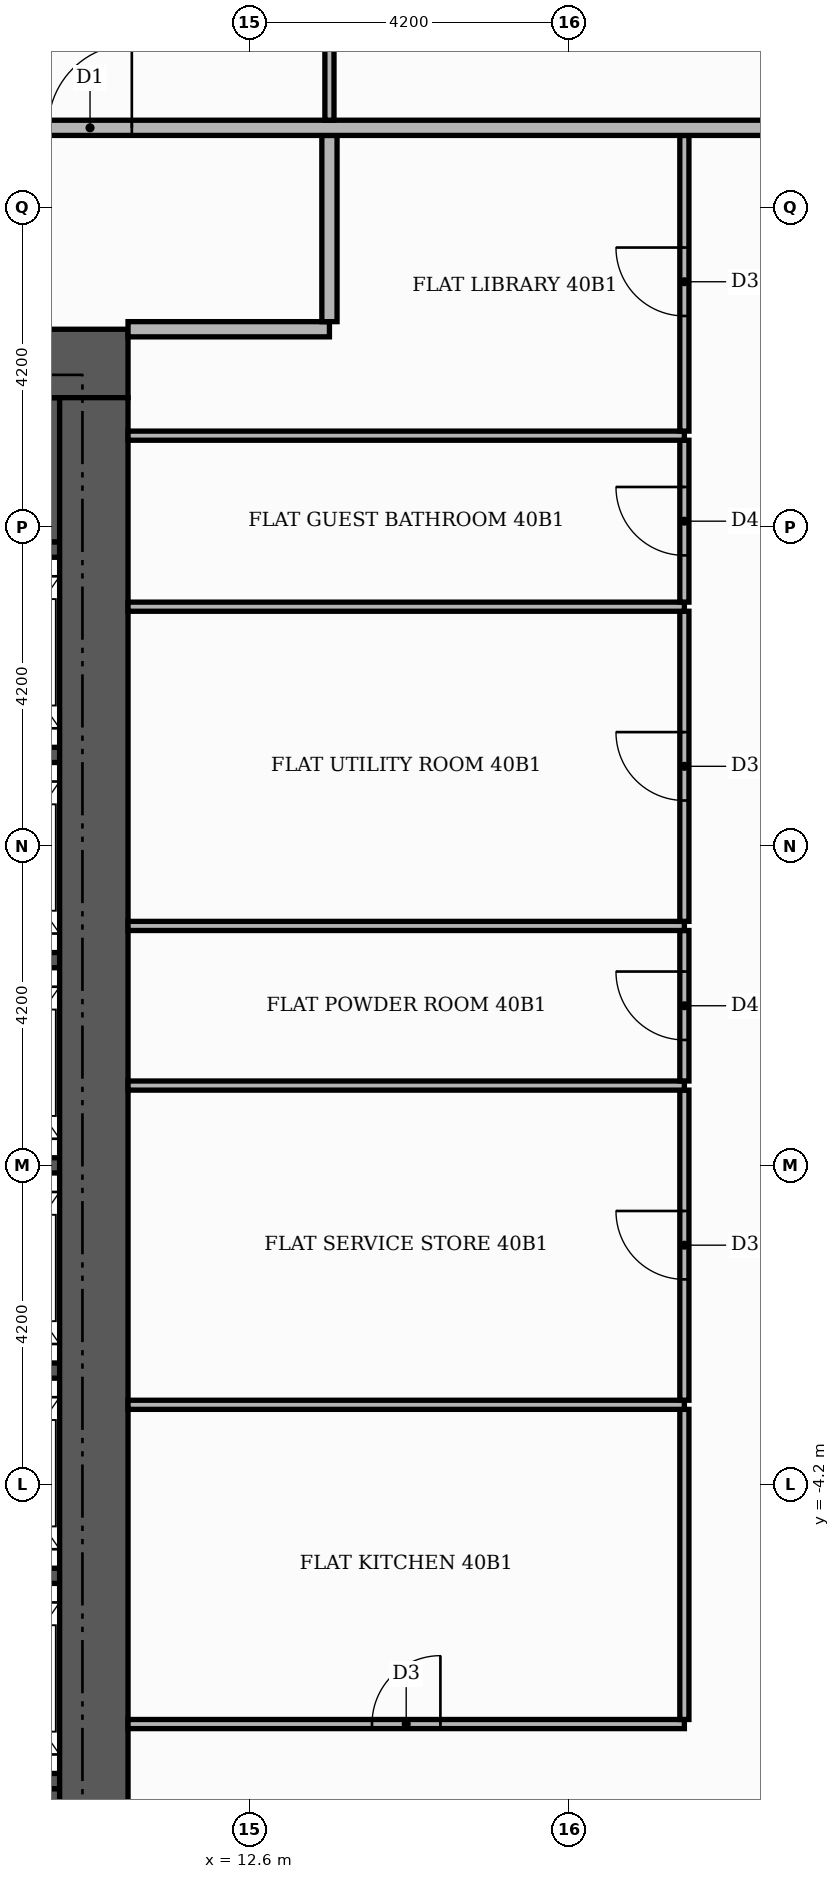
"""IFC4 building model, lengths in metres.
Left out: names, types, materials, properties, quantities, classifications, styles, units other than length and angle.
Written with IfcOpenShell. Run it as: python <this file> out.ifc"""

import sys

from ifc_helpers import new_model, si_unit, direction, frame, frame_2d, origin, place, context, subcontext, project, spatial, rectangle, extrude, element, fill, save


model = new_model("IFC4")
c1 = context("Model", 3, precision=1e-05, world=origin(), true_north=direction((0.0, 1.0)))
c2 = subcontext(c1, "Body", "Model", "MODEL_VIEW")
j1 = project(units=[si_unit("LENGTHUNIT", "METRE"), si_unit("PLANEANGLEUNIT", "RADIAN")], contexts=[c1])
p1 = place(None, origin())
s1 = spatial("IfcSite", under=j1, at=p1, CompositionType="ELEMENT")
p2 = place(p1, origin())
s2 = spatial("IfcBuilding", under=s1, at=p2, CompositionType="ELEMENT")
p3 = place(p2, frame((0.0, 0.0, 168.9)))
s3 = spatial("IfcBuildingStorey", under=s2, at=p3, CompositionType="ELEMENT", Elevation=168.9)
for number, where, z_axis, x_axis in (
    (1, (5.5, -9.15, 0.0), (0.0, 0.0, 1.0), (1.0, 0.0, 0.0)),
    (2, (5.5, 9.15, 0.0), (0.0, 0.0, 1.0), (1.0, 0.0, 0.0)),
):
    element("IfcWall", number, at=place(p3, frame(where, z_axis=z_axis, x_axis=x_axis)), inside=s3, PredefinedType="SHEAR", context=c2, shape_type="SweptSolid", body=[
        extrude(rectangle(XDim=4.6, YDim=1.9, at=frame_2d((2.3, 0.0))), origin(), (0.0, 0.0, 1.0), 3.48),
    ])
for number, where, z_axis, x_axis in (
    (3, (8.1, -8.1, 0.0), (0.0, 0.0, 1.0), (1.0, 0.0, 0.0)),
    (4, (8.1, -5.4, 0.0), (0.0, 0.0, 1.0), (1.0, 0.0, 0.0)),
    (5, (8.1, -2.7, 0.0), (0.0, 0.0, 1.0), (1.0, 0.0, 0.0)),
    (6, (8.1, 0.0, 0.0), (0.0, 0.0, 1.0), (1.0, 0.0, 0.0)),
    (7, (8.1, 2.7, 0.0), (0.0, 0.0, 1.0), (1.0, 0.0, 0.0)),
    (8, (8.1, 5.4, 0.0), (0.0, 0.0, 1.0), (1.0, 0.0, 0.0)),
    (9, (8.1, 8.1, 0.0), (0.0, 0.0, 1.0), (1.0, 0.0, 0.0)),
):
    element("IfcWall", number, at=place(p3, frame(where, z_axis=z_axis, x_axis=x_axis)), inside=s3, PredefinedType="SHEAR", context=c2, shape_type="SweptSolid", body=[
        extrude(rectangle(XDim=2.0, YDim=0.2, at=frame_2d((1.0, 0.0))), origin(), (0.0, 0.0, 1.0), 3.48),
    ])
p4 = place(p3, frame((-11.0, 10.55, 0.0), z_axis=(0.0, 0.0, 1.0), x_axis=(1.0, 0.0, 0.0)))
e10 = element("IfcWall", 10, at=p4, inside=s3, PredefinedType="SHEAR", context=c2, shape_type="SweptSolid", body=[
    extrude(rectangle(XDim=22.0, YDim=0.9, at=frame_2d((11.0, 0.0))), origin(), (0.0, 0.0, 1.0), 3.48),
])
p5 = place(p4, frame((13.3, 0.0, 0.0)))
e11 = element("IfcOpeningElement", 11, at=p5, cuts=e10, PredefinedType="OPENING", context=c2, shape_type="SweptSolid", body=[
    extrude(rectangle(XDim=1.8, YDim=2.2, at=frame_2d((0.9, 1.1))), frame((0.0, 0.46, 0.0), z_axis=(0.0, -1.0, 0.0), x_axis=(1.0, 0.0, 0.0)), (0.0, 0.0, 1.0), 0.92),
])
p6 = place(p3, frame((10.55, -10.1, 0.0), z_axis=(0.0, 0.0, 1.0), x_axis=(0.0, 1.0, 0.0)))
e12 = element("IfcWall", 12, at=p6, inside=s3, PredefinedType="SHEAR", context=c2, shape_type="SweptSolid", body=[
    extrude(rectangle(XDim=20.2, YDim=0.9, at=frame_2d((10.1, 0.0))), origin(), (0.0, 0.0, 1.0), 3.48),
])
p7 = place(p3, frame((11.0, -7.35, 0.0), z_axis=(0.0, 0.0, 1.0), x_axis=(1.0, 0.0, 0.0)))
e13 = element("IfcWall", 13, at=p7, inside=s3, PredefinedType="PARTITIONING", context=c2, shape_type="SweptSolid", body=[
    extrude(rectangle(XDim=7.32, YDim=0.12, at=frame_2d((3.66, 0.0))), origin(), (0.0, 0.0, 1.0), 3.48),
])
p8 = place(p7, frame((3.21, 0.0, 0.0)))
e14 = element("IfcOpeningElement", 14, at=p8, cuts=e13, PredefinedType="OPENING", context=c2, shape_type="SweptSolid", body=[
    extrude(rectangle(XDim=0.9, YDim=2.1, at=frame_2d((0.45, 1.05))), frame((0.0, 0.07, 0.0), z_axis=(0.0, -1.0, 0.0), x_axis=(1.0, 0.0, 0.0)), (0.0, 0.0, 1.0), 0.14),
])
p9 = place(p3, frame((18.32, -7.29, 0.0), z_axis=(0.0, 0.0, 1.0), x_axis=(0.0, 1.0, 0.0)))
e15 = element("IfcWall", 15, at=p9, inside=s3, PredefinedType="PARTITIONING", context=c2, shape_type="SweptSolid", body=[
    extrude(rectangle(XDim=4.08, YDim=0.12, at=frame_2d((2.04, 0.0))), origin(), (0.0, 0.0, 1.0), 3.48),
])
p10 = place(p3, frame((11.0, -3.15, 0.0), z_axis=(0.0, 0.0, 1.0), x_axis=(1.0, 0.0, 0.0)))
e16 = element("IfcWall", 16, at=p10, inside=s3, PredefinedType="PARTITIONING", context=c2, shape_type="SweptSolid", body=[
    extrude(rectangle(XDim=7.32, YDim=0.12, at=frame_2d((3.66, 0.0))), origin(), (0.0, 0.0, 1.0), 3.48),
])
p11 = place(p3, frame((18.32, -3.09, 0.0), z_axis=(0.0, 0.0, 1.0), x_axis=(0.0, 1.0, 0.0)))
e17 = element("IfcWall", 17, at=p11, inside=s3, PredefinedType="PARTITIONING", context=c2, shape_type="SweptSolid", body=[
    extrude(rectangle(XDim=4.08, YDim=0.12, at=frame_2d((2.04, 0.0))), origin(), (0.0, 0.0, 1.0), 3.48),
])
p12 = place(p11, frame((1.59, 0.0, 0.0)))
e18 = element("IfcOpeningElement", 18, at=p12, cuts=e17, PredefinedType="OPENING", context=c2, shape_type="SweptSolid", body=[
    extrude(rectangle(XDim=0.9, YDim=2.1, at=frame_2d((0.45, 1.05))), frame((0.0, 0.07, 0.0), z_axis=(0.0, -1.0, 0.0), x_axis=(1.0, 0.0, 0.0)), (0.0, 0.0, 1.0), 0.14),
])
p13 = place(p3, frame((11.0, 1.05, 0.0), z_axis=(0.0, 0.0, 1.0), x_axis=(1.0, 0.0, 0.0)))
e19 = element("IfcWall", 19, at=p13, inside=s3, PredefinedType="PARTITIONING", context=c2, shape_type="SweptSolid", body=[
    extrude(rectangle(XDim=7.32, YDim=0.12, at=frame_2d((3.66, 0.0))), origin(), (0.0, 0.0, 1.0), 3.48),
])
p14 = place(p3, frame((18.32, 1.11, 0.0), z_axis=(0.0, 0.0, 1.0), x_axis=(0.0, 1.0, 0.0)))
e20 = element("IfcWall", 20, at=p14, inside=s3, PredefinedType="PARTITIONING", context=c2, shape_type="SweptSolid", body=[
    extrude(rectangle(XDim=1.98, YDim=0.12, at=frame_2d((0.99, 0.0))), origin(), (0.0, 0.0, 1.0), 3.48),
])
p15 = place(p14, frame((0.54, 0.0, 0.0)))
e21 = element("IfcOpeningElement", 21, at=p15, cuts=e20, PredefinedType="OPENING", context=c2, shape_type="SweptSolid", body=[
    extrude(rectangle(XDim=0.9, YDim=2.1, at=frame_2d((0.45, 1.05))), frame((0.0, 0.07, 0.0), z_axis=(0.0, -1.0, 0.0), x_axis=(1.0, 0.0, 0.0)), (0.0, 0.0, 1.0), 0.14),
])
p16 = place(p3, frame((11.0, 3.15, 0.0), z_axis=(0.0, 0.0, 1.0), x_axis=(1.0, 0.0, 0.0)))
e22 = element("IfcWall", 22, at=p16, inside=s3, PredefinedType="PARTITIONING", context=c2, shape_type="SweptSolid", body=[
    extrude(rectangle(XDim=7.32, YDim=0.12, at=frame_2d((3.66, 0.0))), origin(), (0.0, 0.0, 1.0), 3.48),
])
p17 = place(p3, frame((18.32, 3.21, 0.0), z_axis=(0.0, 0.0, 1.0), x_axis=(0.0, 1.0, 0.0)))
e23 = element("IfcWall", 23, at=p17, inside=s3, PredefinedType="PARTITIONING", context=c2, shape_type="SweptSolid", body=[
    extrude(rectangle(XDim=4.08, YDim=0.12, at=frame_2d((2.04, 0.0))), origin(), (0.0, 0.0, 1.0), 3.48),
])
p18 = place(p17, frame((1.59, 0.0, 0.0)))
e24 = element("IfcOpeningElement", 24, at=p18, cuts=e23, PredefinedType="OPENING", context=c2, shape_type="SweptSolid", body=[
    extrude(rectangle(XDim=0.9, YDim=2.1, at=frame_2d((0.45, 1.05))), frame((0.0, 0.07, 0.0), z_axis=(0.0, -1.0, 0.0), x_axis=(1.0, 0.0, 0.0)), (0.0, 0.0, 1.0), 0.14),
])
p19 = place(p3, frame((11.0, 7.35, 0.0), z_axis=(0.0, 0.0, 1.0), x_axis=(1.0, 0.0, 0.0)))
e25 = element("IfcWall", 25, at=p19, inside=s3, PredefinedType="PARTITIONING", context=c2, shape_type="SweptSolid", body=[
    extrude(rectangle(XDim=7.32, YDim=0.12, at=frame_2d((3.66, 0.0))), origin(), (0.0, 0.0, 1.0), 3.48),
])
p20 = place(p3, frame((18.32, 7.41, 0.0), z_axis=(0.0, 0.0, 1.0), x_axis=(0.0, 1.0, 0.0)))
e26 = element("IfcWall", 26, at=p20, inside=s3, PredefinedType="PARTITIONING", context=c2, shape_type="SweptSolid", body=[
    extrude(rectangle(XDim=2.13, YDim=0.12, at=frame_2d((1.065, 0.0))), origin(), (0.0, 0.0, 1.0), 3.48),
])
p21 = place(p20, frame((0.615, 0.0, 0.0)))
e27 = element("IfcOpeningElement", 27, at=p21, cuts=e26, PredefinedType="OPENING", context=c2, shape_type="SweptSolid", body=[
    extrude(rectangle(XDim=0.9, YDim=2.1, at=frame_2d((0.45, 1.05))), frame((0.0, 0.07, 0.0), z_axis=(0.0, -1.0, 0.0), x_axis=(1.0, 0.0, 0.0)), (0.0, 0.0, 1.0), 0.14),
])
p22 = place(p3, frame((11.0, 9.6, 0.0), z_axis=(0.0, 0.0, 1.0), x_axis=(1.0, 0.0, 0.0)))
e28 = element("IfcWall", 28, at=p22, inside=s3, PredefinedType="PARTITIONING", context=c2, shape_type="SweptSolid", body=[
    extrude(rectangle(XDim=7.32, YDim=0.12, at=frame_2d((3.66, 0.0))), origin(), (0.0, 0.0, 1.0), 3.48),
])
p23 = place(p3, frame((18.32, 9.66, 0.0), z_axis=(0.0, 0.0, 1.0), x_axis=(0.0, 1.0, 0.0)))
e29 = element("IfcWall", 29, at=p23, inside=s3, PredefinedType="PARTITIONING", context=c2, shape_type="SweptSolid", body=[
    extrude(rectangle(XDim=3.89, YDim=0.12, at=frame_2d((1.945, 0.0))), origin(), (0.0, 0.0, 1.0), 3.48),
])
p24 = place(p23, frame((1.515, 0.0, 0.0)))
e30 = element("IfcOpeningElement", 30, at=p24, cuts=e29, PredefinedType="OPENING", context=c2, shape_type="SweptSolid", body=[
    extrude(rectangle(XDim=0.9, YDim=2.1, at=frame_2d((0.45, 1.05))), frame((0.0, 0.07, 0.0), z_axis=(0.0, -1.0, 0.0), x_axis=(1.0, 0.0, 0.0)), (0.0, 0.0, 1.0), 0.14),
])
p25 = place(p3, frame((11.0, 11.0, 0.0), z_axis=(0.0, 0.0, 1.0), x_axis=(1.0, 0.0, 0.0)))
e31 = element("IfcWall", 31, at=p25, inside=s3, PredefinedType="PARTITIONING", context=c2, shape_type="SweptSolid", body=[
    extrude(rectangle(XDim=2.65, YDim=0.2, at=frame_2d((1.325, 0.0))), origin(), (0.0, 0.0, 1.0), 3.48),
])
p26 = place(p3, frame((13.65, 11.1, 0.0), z_axis=(0.0, 0.0, 1.0), x_axis=(0.0, 1.0, 0.0)))
e32 = element("IfcWall", 32, at=p26, inside=s3, PredefinedType="PARTITIONING", context=c2, shape_type="SweptSolid", body=[
    extrude(rectangle(XDim=2.45, YDim=0.2, at=frame_2d((1.225, 0.0))), origin(), (0.0, 0.0, 1.0), 3.48),
])
p27 = place(p3, frame((-13.65, 13.65, 0.0), z_axis=(0.0, 0.0, 1.0), x_axis=(1.0, 0.0, 0.0)))
e33 = element("IfcWall", 33, at=p27, inside=s3, PredefinedType="PARTITIONING", context=c2, shape_type="SweptSolid", body=[
    extrude(rectangle(XDim=39.07, YDim=0.2, at=frame_2d((19.535, 0.0))), origin(), (0.0, 0.0, 1.0), 3.48),
])
p28 = place(p27, frame((23.6, 0.0, 0.0)))
e34 = element("IfcOpeningElement", 34, at=p28, cuts=e33, PredefinedType="OPENING", context=c2, shape_type="SweptSolid", body=[
    extrude(rectangle(XDim=1.1, YDim=2.4, at=frame_2d((0.55, 1.2))), frame((0.0, 0.11, 0.0), z_axis=(0.0, -1.0, 0.0), x_axis=(1.0, 0.0, 0.0)), (0.0, 0.0, 1.0), 0.22),
])
p29 = place(p3, frame((13.65, 13.75, 0.0), z_axis=(0.0, 0.0, 1.0), x_axis=(0.0, 1.0, 0.0)))
e35 = element("IfcWall", 35, at=p29, inside=s3, PredefinedType="PARTITIONING", context=c2, shape_type="SweptSolid", body=[
    extrude(rectangle(XDim=6.91, YDim=0.12, at=frame_2d((3.455, 0.0))), origin(), (0.0, 0.0, 1.0), 3.48),
])
p30 = place(p29, frame((2.985, 0.0, 0.0)))
e36 = element("IfcOpeningElement", 36, at=p30, cuts=e35, PredefinedType="OPENING", context=c2, shape_type="SweptSolid", body=[
    extrude(rectangle(XDim=0.9, YDim=2.1, at=frame_2d((0.45, 1.05))), frame((0.0, 0.07, 0.0), z_axis=(0.0, -1.0, 0.0), x_axis=(1.0, 0.0, 0.0)), (0.0, 0.0, 1.0), 0.14),
])
p31 = place(p8, origin())
e37 = element("IfcDoor", 37, at=p31, inside=s3, OperationType="SINGLE_SWING_RIGHT", PredefinedType="DOOR", context=c2, shape_type="SweptSolid", body=[
    extrude(rectangle(XDim=0.9, YDim=2.1, at=frame_2d((0.45, 1.05))), frame((0.0, 0.025, 0.0), z_axis=(0.0, -1.0, 0.0), x_axis=(1.0, 0.0, 0.0)), (0.0, 0.0, 1.0), 0.05),
])
fill(e14, e37)
p32 = place(p12, origin())
e38 = element("IfcDoor", 38, at=p32, inside=s3, OperationType="SINGLE_SWING_RIGHT", PredefinedType="DOOR", context=c2, shape_type="SweptSolid", body=[
    extrude(rectangle(XDim=0.9, YDim=2.1, at=frame_2d((0.45, 1.05))), frame((0.0, 0.025, 0.0), z_axis=(0.0, -1.0, 0.0), x_axis=(1.0, 0.0, 0.0)), (0.0, 0.0, 1.0), 0.05),
])
fill(e18, e38)
p33 = place(p15, origin())
e39 = element("IfcDoor", 39, at=p33, inside=s3, OperationType="SINGLE_SWING_RIGHT", PredefinedType="DOOR", context=c2, shape_type="SweptSolid", body=[
    extrude(rectangle(XDim=0.9, YDim=2.1, at=frame_2d((0.45, 1.05))), frame((0.0, 0.025, 0.0), z_axis=(0.0, -1.0, 0.0), x_axis=(1.0, 0.0, 0.0)), (0.0, 0.0, 1.0), 0.05),
])
fill(e21, e39)
p34 = place(p18, origin())
e40 = element("IfcDoor", 40, at=p34, inside=s3, OperationType="SINGLE_SWING_RIGHT", PredefinedType="DOOR", context=c2, shape_type="SweptSolid", body=[
    extrude(rectangle(XDim=0.9, YDim=2.1, at=frame_2d((0.45, 1.05))), frame((0.0, 0.025, 0.0), z_axis=(0.0, -1.0, 0.0), x_axis=(1.0, 0.0, 0.0)), (0.0, 0.0, 1.0), 0.05),
])
fill(e24, e40)
p35 = place(p21, origin())
e41 = element("IfcDoor", 41, at=p35, inside=s3, OperationType="SINGLE_SWING_RIGHT", PredefinedType="DOOR", context=c2, shape_type="SweptSolid", body=[
    extrude(rectangle(XDim=0.9, YDim=2.1, at=frame_2d((0.45, 1.05))), frame((0.0, 0.025, 0.0), z_axis=(0.0, -1.0, 0.0), x_axis=(1.0, 0.0, 0.0)), (0.0, 0.0, 1.0), 0.05),
])
fill(e27, e41)
p36 = place(p24, origin())
e42 = element("IfcDoor", 42, at=p36, inside=s3, OperationType="SINGLE_SWING_RIGHT", PredefinedType="DOOR", context=c2, shape_type="SweptSolid", body=[
    extrude(rectangle(XDim=0.9, YDim=2.1, at=frame_2d((0.45, 1.05))), frame((0.0, 0.025, 0.0), z_axis=(0.0, -1.0, 0.0), x_axis=(1.0, 0.0, 0.0)), (0.0, 0.0, 1.0), 0.05),
])
fill(e30, e42)
p37 = place(p28, origin())
e43 = element("IfcDoor", 43, at=p37, inside=s3, OperationType="SINGLE_SWING_RIGHT", PredefinedType="DOOR", context=c2, shape_type="SweptSolid", body=[
    extrude(rectangle(XDim=1.1, YDim=2.4, at=frame_2d((0.55, 1.2))), frame((0.0, 0.025, 0.0), z_axis=(0.0, -1.0, 0.0), x_axis=(1.0, 0.0, 0.0)), (0.0, 0.0, 1.0), 0.05),
])
fill(e34, e43)
save(model, sys.argv[1])
